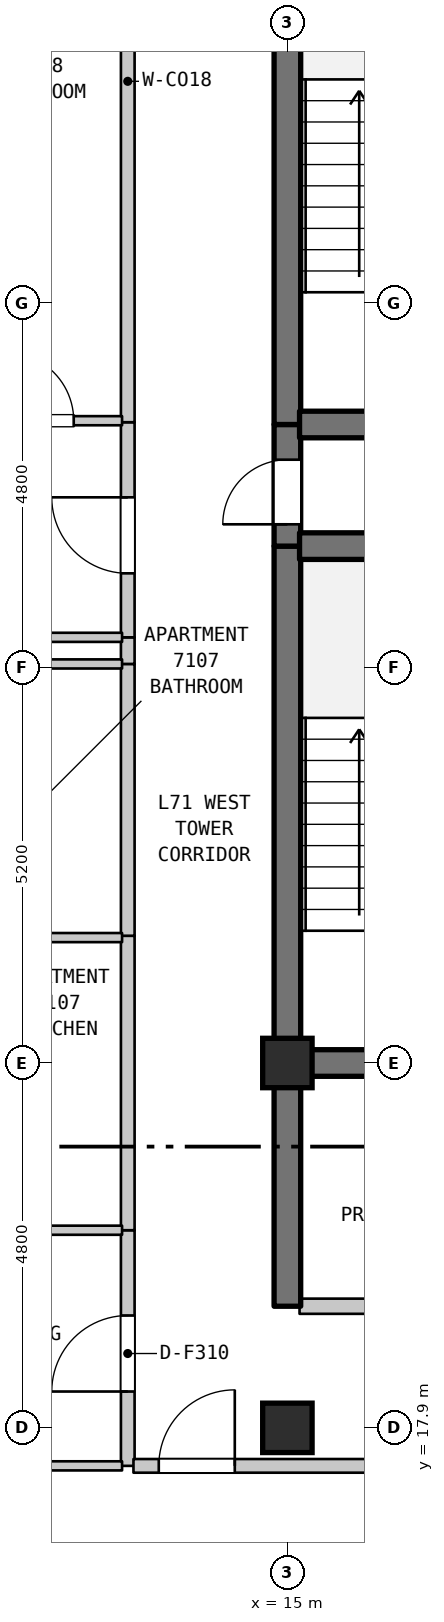
"""IFC4 building model, lengths in metres.
Left out: names, types, materials, properties, quantities, classifications, styles, units other than length and angle.
Written with IfcOpenShell. Run it as: python <this file> out.ifc"""

import sys

from ifc_helpers import new_model, si_unit, direction, frame, frame_2d, origin, origin_2d, place, context, subcontext, project, spatial, rectangle, extrude, element, fill, save


model = new_model("IFC4")
c1 = context("Model", 3, precision=1e-05, world=origin(), true_north=direction((0.0, 1.0)))
c2 = subcontext(c1, "Body", "Model", "MODEL_VIEW")
j1 = project(units=[si_unit("LENGTHUNIT", "METRE"), si_unit("PLANEANGLEUNIT", "RADIAN")], contexts=[c1])
p1 = place(None, origin())
s1 = spatial("IfcSite", under=j1, at=p1, CompositionType="ELEMENT")
p2 = place(p1, origin())
s2 = spatial("IfcBuilding", under=s1, at=p2, CompositionType="ELEMENT")
p3 = place(p2, frame((0.0, 0.0, 284.3)))
s3 = spatial("IfcBuildingStorey", under=s2, at=p3, CompositionType="ELEMENT", Elevation=284.3)
for number, where, z_axis, x_axis in (
    (1, (15.0, 17.9, 0.0), (0.0, 0.0, 1.0), (1.0, 0.0, 0.0)),
    (2, (15.0, 22.7, 0.0), (0.0, 0.0, 1.0), (1.0, 0.0, 0.0)),
):
    element("IfcColumn", number, at=place(p3, frame(where, z_axis=z_axis, x_axis=x_axis)), inside=s3, PredefinedType="COLUMN", context=c2, shape_type="SweptSolid", body=[
        extrude(rectangle(XDim=0.65, YDim=0.65, at=origin_2d()), origin(), (0.0, 0.0, 1.0), 3.7),
    ])
p4 = place(p3, frame((12.9, 17.4, 0.0), z_axis=(0.0, 0.0, 1.0), x_axis=(0.0, 1.0, 0.0)))
e3 = element("IfcWall", 3, at=p4, inside=s3, PredefinedType="STANDARD", context=c2, shape_type="SweptSolid", body=[
    extrude(rectangle(XDim=3.1, YDim=0.18, at=frame_2d((1.55, 0.0))), origin(), (0.0, 0.0, 1.0), 3.39),
])
p5 = place(p4, frame((0.978, 0.0, 0.0)))
e4 = element("IfcOpeningElement", 4, at=p5, cuts=e3, PredefinedType="OPENING", context=c2, shape_type="SweptSolid", body=[
    extrude(rectangle(XDim=1.0, YDim=2.15, at=frame_2d((0.5, 1.075))), frame((0.0, 0.1, 0.0), z_axis=(0.0, -1.0, 0.0), x_axis=(1.0, 0.0, 0.0)), (0.0, 0.0, 1.0), 0.2),
])
p6 = place(p3, frame((12.9, 20.5, 0.0), z_axis=(0.0, 0.0, 1.0), x_axis=(0.0, 1.0, 0.0)))
e5 = element("IfcWall", 5, at=p6, inside=s3, PredefinedType="STANDARD", context=c2, shape_type="SweptSolid", body=[
    extrude(rectangle(XDim=3.874, YDim=0.18, at=frame_2d((1.937, 0.0))), origin(), (0.0, 0.0, 1.0), 3.39),
])
p7 = place(p3, frame((12.9, 24.374, 0.0), z_axis=(0.0, 0.0, 1.0), x_axis=(0.0, 1.0, 0.0)))
e6 = element("IfcWall", 6, at=p7, inside=s3, PredefinedType="STANDARD", context=c2, shape_type="SweptSolid", body=[
    extrude(rectangle(XDim=3.576, YDim=0.18, at=frame_2d((1.788, 0.0))), origin(), (0.0, 0.0, 1.0), 3.39),
])
p8 = place(p3, frame((12.9, 27.95, 0.0), z_axis=(0.0, 0.0, 1.0), x_axis=(0.0, 1.0, 0.0)))
e7 = element("IfcWall", 7, at=p8, inside=s3, PredefinedType="STANDARD", context=c2, shape_type="SweptSolid", body=[
    extrude(rectangle(XDim=0.35, YDim=0.18, at=frame_2d((0.175, 0.0))), origin(), (0.0, 0.0, 1.0), 3.39),
])
p9 = place(p3, frame((12.9, 28.3, 0.0), z_axis=(0.0, 0.0, 1.0), x_axis=(0.0, 1.0, 0.0)))
e8 = element("IfcWall", 8, at=p9, inside=s3, PredefinedType="STANDARD", context=c2, shape_type="SweptSolid", body=[
    extrude(rectangle(XDim=2.83, YDim=0.18, at=frame_2d((1.415, 0.0))), origin(), (0.0, 0.0, 1.0), 3.39),
])
p10 = place(p9, frame((0.842, 0.0, 0.0)))
e9 = element("IfcOpeningElement", 9, at=p10, cuts=e8, PredefinedType="OPENING", context=c2, shape_type="SweptSolid", body=[
    extrude(rectangle(XDim=1.0, YDim=2.15, at=frame_2d((0.5, 1.075))), frame((0.0, 0.1, 0.0), z_axis=(0.0, -1.0, 0.0), x_axis=(1.0, 0.0, 0.0)), (0.0, 0.0, 1.0), 0.2),
])
p11 = place(p3, frame((12.9, 31.13, 0.0), z_axis=(0.0, 0.0, 1.0), x_axis=(0.0, 1.0, 0.0)))
e10 = element("IfcWall", 10, at=p11, inside=s3, PredefinedType="STANDARD", context=c2, shape_type="SweptSolid", body=[
    extrude(rectangle(XDim=8.97, YDim=0.18, at=frame_2d((4.485, 0.0))), origin(), (0.0, 0.0, 1.0), 3.39),
])
p12 = place(p3, frame((15.0, 19.5, 0.0), z_axis=(0.0, 0.0, 1.0), x_axis=(0.0, 1.0, 0.0)))
e11 = element("IfcWall", 11, at=p12, inside=s3, PredefinedType="SHEAR", context=c2, shape_type="SweptSolid", body=[
    extrude(rectangle(XDim=3.2, YDim=0.35, at=frame_2d((1.6, 0.0))), origin(), (0.0, 0.0, 1.0), 3.39),
])
p13 = place(p3, frame((15.0, 22.7, 0.0), z_axis=(0.0, 0.0, 1.0), x_axis=(0.0, 1.0, 0.0)))
e12 = element("IfcWall", 12, at=p13, inside=s3, PredefinedType="SHEAR", context=c2, shape_type="SweptSolid", body=[
    extrude(rectangle(XDim=6.8, YDim=0.35, at=frame_2d((3.4, 0.0))), origin(), (0.0, 0.0, 1.0), 3.39),
])
p14 = place(p3, frame((15.0, 29.5, 0.0), z_axis=(0.0, 0.0, 1.0), x_axis=(0.0, 1.0, 0.0)))
e13 = element("IfcWall", 13, at=p14, inside=s3, PredefinedType="SHEAR", context=c2, shape_type="SweptSolid", body=[
    extrude(rectangle(XDim=1.6, YDim=0.35, at=frame_2d((0.8, 0.0))), origin(), (0.0, 0.0, 1.0), 3.39),
])
p15 = place(p14, frame((0.287, 0.0, 0.0)))
e14 = element("IfcOpeningElement", 14, at=p15, cuts=e13, PredefinedType="OPENING", context=c2, shape_type="SweptSolid", body=[
    extrude(rectangle(XDim=0.85, YDim=2.1, at=frame_2d((0.425, 1.05))), frame((0.0, 0.185, 0.0), z_axis=(0.0, -1.0, 0.0), x_axis=(1.0, 0.0, 0.0)), (0.0, 0.0, 1.0), 0.37),
])
p16 = place(p3, frame((15.0, 31.1, 0.0), z_axis=(0.0, 0.0, 1.0), x_axis=(0.0, 1.0, 0.0)))
e15 = element("IfcWall", 15, at=p16, inside=s3, PredefinedType="SHEAR", context=c2, shape_type="SweptSolid", body=[
    extrude(rectangle(XDim=6.8, YDim=0.35, at=frame_2d((3.4, 0.0))), origin(), (0.0, 0.0, 1.0), 3.39),
])
p17 = place(p3, frame((8.973, 17.4, 0.0), z_axis=(0.0, 0.0, 1.0), x_axis=(1.0, 0.0, 0.0)))
e16 = element("IfcWall", 16, at=p17, inside=s3, PredefinedType="PARTITIONING", context=c2, shape_type="SweptSolid", body=[
    extrude(rectangle(XDim=3.852, YDim=0.12, at=frame_2d((1.926, 0.0))), origin(), (0.0, 0.0, 1.0), 3.39),
])
p18 = place(p3, frame((12.975, 17.4, 0.0), z_axis=(0.0, 0.0, 1.0), x_axis=(1.0, 0.0, 0.0)))
e17 = element("IfcWall", 17, at=p18, inside=s3, PredefinedType="STANDARD", context=c2, shape_type="SweptSolid", body=[
    extrude(rectangle(XDim=3.48, YDim=0.18, at=frame_2d((1.74, 0.0))), origin(), (0.0, 0.0, 1.0), 3.39),
])
p19 = place(p18, frame((0.333, 0.0, 0.0)))
e18 = element("IfcOpeningElement", 18, at=p19, cuts=e17, PredefinedType="OPENING", context=c2, shape_type="SweptSolid", body=[
    extrude(rectangle(XDim=1.0, YDim=2.15, at=frame_2d((0.5, 1.075))), frame((0.0, 0.1, 0.0), z_axis=(0.0, -1.0, 0.0), x_axis=(1.0, 0.0, 0.0)), (0.0, 0.0, 1.0), 0.2),
])
p20 = place(p3, frame((15.16, 19.5, 0.0), z_axis=(0.0, 0.0, 1.0), x_axis=(1.0, 0.0, 0.0)))
e19 = element("IfcWall", 19, at=p20, inside=s3, PredefinedType="STANDARD", context=c2, shape_type="SweptSolid", body=[
    extrude(rectangle(XDim=3.68, YDim=0.2, at=frame_2d((1.84, 0.0))), origin(), (0.0, 0.0, 1.0), 3.39),
])
p21 = place(p20, frame((1.39, 0.0, 0.0)))
e20 = element("IfcOpeningElement", 20, at=p21, cuts=e19, PredefinedType="OPENING", context=c2, shape_type="SweptSolid", body=[
    extrude(rectangle(XDim=0.9, YDim=2.15, at=frame_2d((0.45, 1.075))), frame((0.0, 0.11, 0.0), z_axis=(0.0, -1.0, 0.0), x_axis=(1.0, 0.0, 0.0)), (0.0, 0.0, 1.0), 0.22),
])
p22 = place(p3, frame((10.695, 20.5, 0.0), z_axis=(0.0, 0.0, 1.0), x_axis=(1.0, 0.0, 0.0)))
e21 = element("IfcWall", 21, at=p22, inside=s3, PredefinedType="PARTITIONING", context=c2, shape_type="SweptSolid", body=[
    extrude(rectangle(XDim=2.13, YDim=0.12, at=frame_2d((1.065, 0.0))), origin(), (0.0, 0.0, 1.0), 3.39),
])
p23 = place(p3, frame((15.16, 22.7, 0.0), z_axis=(0.0, 0.0, 1.0), x_axis=(1.0, 0.0, 0.0)))
e22 = element("IfcWall", 22, at=p23, inside=s3, PredefinedType="SHEAR", context=c2, shape_type="SweptSolid", body=[
    extrude(rectangle(XDim=3.68, YDim=0.35, at=frame_2d((1.84, 0.0))), origin(), (0.0, 0.0, 1.0), 3.39),
])
for number, where, z_axis, x_axis in (
    (23, (10.695, 24.35, 0.0), (0.0, 0.0, 1.0), (1.0, 0.0, 0.0)),
    (24, (10.695, 27.95, 0.0), (0.0, 0.0, 1.0), (1.0, 0.0, 0.0)),
):
    element("IfcWall", number, at=place(p3, frame(where, z_axis=z_axis, x_axis=x_axis)), inside=s3, PredefinedType="PARTITIONING", context=c2, shape_type="SweptSolid", body=[
        extrude(rectangle(XDim=2.13, YDim=0.12, at=frame_2d((1.065, 0.0))), origin(), (0.0, 0.0, 1.0), 3.39),
    ])
p24 = place(p3, frame((9.175, 28.3, 0.0), z_axis=(0.0, 0.0, 1.0), x_axis=(1.0, 0.0, 0.0)))
e25 = element("IfcWall", 25, at=p24, inside=s3, PredefinedType="PARTITIONING", context=c2, shape_type="SweptSolid", body=[
    extrude(rectangle(XDim=3.65, YDim=0.12, at=frame_2d((1.825, 0.0))), origin(), (0.0, 0.0, 1.0), 3.39),
])
for number, where, z_axis, x_axis in (
    (26, (15.16, 29.5, 0.0), (0.0, 0.0, 1.0), (1.0, 0.0, 0.0)),
    (27, (15.16, 31.1, 0.0), (0.0, 0.0, 1.0), (1.0, 0.0, 0.0)),
):
    element("IfcWall", number, at=place(p3, frame(where, z_axis=z_axis, x_axis=x_axis)), inside=s3, PredefinedType="SHEAR", context=c2, shape_type="SweptSolid", body=[
        extrude(rectangle(XDim=3.68, YDim=0.35, at=frame_2d((1.84, 0.0))), origin(), (0.0, 0.0, 1.0), 3.39),
    ])
p25 = place(p3, frame((10.623, 31.15, 0.0), z_axis=(0.0, 0.0, 1.0), x_axis=(1.0, 0.0, 0.0)))
e28 = element("IfcWall", 28, at=p25, inside=s3, PredefinedType="PARTITIONING", context=c2, shape_type="SweptSolid", body=[
    extrude(rectangle(XDim=2.202, YDim=0.12, at=frame_2d((1.101, 0.0))), origin(), (0.0, 0.0, 1.0), 3.39),
])
p26 = place(p25, frame((0.666, 0.0, 0.0)))
e29 = element("IfcOpeningElement", 29, at=p26, cuts=e28, PredefinedType="OPENING", context=c2, shape_type="SweptSolid", body=[
    extrude(rectangle(XDim=0.9, YDim=2.1, at=frame_2d((0.45, 1.05))), frame((0.0, 0.07, 0.0), z_axis=(0.0, -1.0, 0.0), x_axis=(1.0, 0.0, 0.0)), (0.0, 0.0, 1.0), 0.14),
])
p27 = place(p5, origin())
e30 = element("IfcDoor", 30, at=p27, inside=s3, OperationType="SINGLE_SWING_LEFT", PredefinedType="DOOR", context=c2, shape_type="SweptSolid", body=[
    extrude(rectangle(XDim=1.0, YDim=2.15, at=frame_2d((0.5, 1.075))), frame((0.0, 0.025, 0.0), z_axis=(0.0, -1.0, 0.0), x_axis=(1.0, 0.0, 0.0)), (0.0, 0.0, 1.0), 0.05),
])
fill(e4, e30)
p28 = place(p10, origin())
e31 = element("IfcDoor", 31, at=p28, inside=s3, OperationType="SINGLE_SWING_RIGHT", PredefinedType="DOOR", context=c2, shape_type="SweptSolid", body=[
    extrude(rectangle(XDim=1.0, YDim=2.15, at=frame_2d((0.5, 1.075))), frame((0.0, 0.025, 0.0), z_axis=(0.0, -1.0, 0.0), x_axis=(1.0, 0.0, 0.0)), (0.0, 0.0, 1.0), 0.05),
])
fill(e9, e31)
p29 = place(p15, origin())
e32 = element("IfcDoor", 32, at=p29, inside=s3, OperationType="SINGLE_SWING_LEFT", PredefinedType="DOOR", context=c2, shape_type="SweptSolid", body=[
    extrude(rectangle(XDim=0.85, YDim=2.1, at=frame_2d((0.425, 1.05))), frame((0.0, 0.025, 0.0), z_axis=(0.0, -1.0, 0.0), x_axis=(1.0, 0.0, 0.0)), (0.0, 0.0, 1.0), 0.05),
])
fill(e14, e32)
p30 = place(p19, origin())
e33 = element("IfcDoor", 33, at=p30, inside=s3, OperationType="SINGLE_SWING_RIGHT", PredefinedType="DOOR", context=c2, shape_type="SweptSolid", body=[
    extrude(rectangle(XDim=1.0, YDim=2.15, at=frame_2d((0.5, 1.075))), frame((0.0, 0.025, 0.0), z_axis=(0.0, -1.0, 0.0), x_axis=(1.0, 0.0, 0.0)), (0.0, 0.0, 1.0), 0.05),
])
fill(e18, e33)
p31 = place(p26, origin())
e34 = element("IfcDoor", 34, at=p31, inside=s3, OperationType="SINGLE_SWING_LEFT", PredefinedType="DOOR", context=c2, shape_type="SweptSolid", body=[
    extrude(rectangle(XDim=0.9, YDim=2.1, at=frame_2d((0.45, 1.05))), frame((0.0, 0.025, 0.0), z_axis=(0.0, -1.0, 0.0), x_axis=(1.0, 0.0, 0.0)), (0.0, 0.0, 1.0), 0.05),
])
fill(e29, e34)
save(model, sys.argv[1])
